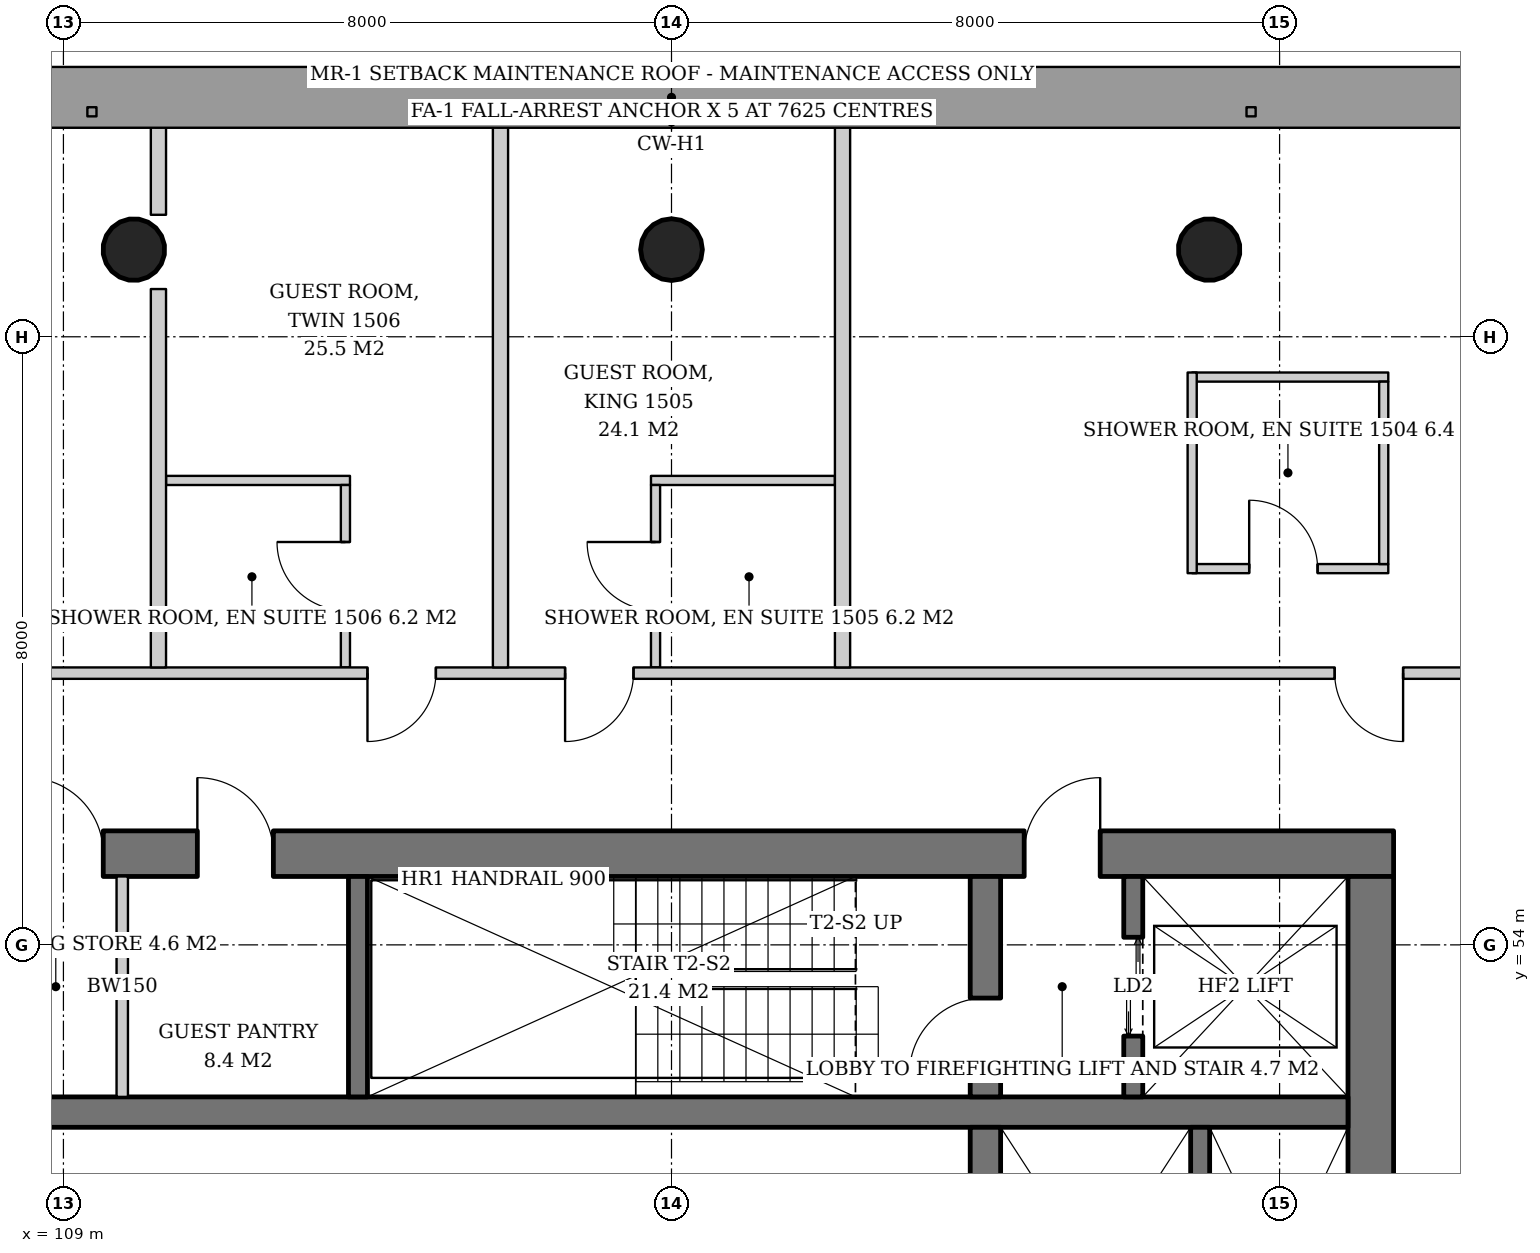
"""IFC4 building model, lengths in metres.
Left out: names, types, materials, properties, quantities, classifications, styles, units other than length and angle.
Written with IfcOpenShell. Run it as: python <this file> out.ifc"""

import sys

from ifc_helpers import new_model, si_unit, direction, frame, frame_2d, origin, origin_2d, place, context, subcontext, project, spatial, rectangle, hollow_circle, extrude, element, fill, save


model = new_model("IFC4")
c1 = context("Model", 3, precision=1e-05, world=origin(), true_north=direction((0.0, 1.0)))
c2 = subcontext(c1, "Body", "Model", "MODEL_VIEW")
j1 = project(units=[si_unit("LENGTHUNIT", "METRE"), si_unit("PLANEANGLEUNIT", "RADIAN")], contexts=[c1])
p1 = place(None, origin())
s1 = spatial("IfcSite", under=j1, at=p1, CompositionType="ELEMENT")
p2 = place(p1, origin())
s2 = spatial("IfcBuilding", under=s1, at=p2, CompositionType="ELEMENT")
p3 = place(p2, frame((0.0, 0.0, 62.8)))
s3 = spatial("IfcBuildingStorey", under=s2, at=p3, CompositionType="ELEMENT", Elevation=62.8)
p4 = place(p3, frame((124.099, 63.198, 0.0), z_axis=(-0.021497706284, -0.043059584825, 0.998841188968), x_axis=(0.894693706707, -0.446680166538, 0.0)))
e1 = element("IfcColumn", 1, at=p4, inside=s3, PredefinedType="COLUMN", context=c2, shape_type="SweptSolid", body=[
    extrude(hollow_circle(Radius=0.406, WallThickness=0.03, at=origin_2d()), origin(), (0.0, 0.0, 1.0), 3.804),
])
p5 = place(p3, frame((117.0, 63.198, 0.0), z_axis=(0.0, -0.043069538298, 0.999072076915), x_axis=(1.0, 0.0, 0.0)))
e2 = element("IfcColumn", 2, at=p5, inside=s3, PredefinedType="COLUMN", context=c2, shape_type="SweptSolid", body=[
    extrude(hollow_circle(Radius=0.406, WallThickness=0.03, at=origin_2d()), origin(), (0.0, 0.0, 1.0), 3.803),
])
p6 = place(p3, frame((109.901, 63.198, 0.0), z_axis=(0.021497706284, -0.043059584825, 0.998841188968), x_axis=(0.894693706707, 0.446680166538, 0.0)))
e3 = element("IfcColumn", 3, at=p6, inside=s3, PredefinedType="COLUMN", context=c2, shape_type="SweptSolid", body=[
    extrude(hollow_circle(Radius=0.406, WallThickness=0.03, at=origin_2d()), origin(), (0.0, 0.0, 1.0), 3.804),
])
p7 = place(p3, frame((107.5, 55.2, 0.0), z_axis=(0.0, 0.0, 1.0), x_axis=(1.0, 0.0, 0.0)))
e4 = element("IfcWall", 4, at=p7, inside=s3, PredefinedType="SHEAR", context=c2, shape_type="SweptSolid", body=[
    extrude(rectangle(XDim=19.0, YDim=0.6, at=frame_2d((9.5, 0.0))), origin(), (0.0, 0.0, 1.0), 3.8),
])
p8 = place(p7, frame((14.14, 0.0, 0.0)))
e5 = element("IfcOpeningElement", 5, at=p8, cuts=e4, PredefinedType="OPENING", context=c2, shape_type="SweptSolid", body=[
    extrude(rectangle(XDim=1.0, YDim=2.1, at=frame_2d((0.5, 1.05))), frame((0.0, 0.31, 0.0), z_axis=(0.0, -1.0, 0.0), x_axis=(1.0, 0.0, 0.0)), (0.0, 0.0, 1.0), 0.62),
])
p9 = place(p7, frame((1.024, 0.0, 0.0)))
e6 = element("IfcOpeningElement", 6, at=p9, cuts=e4, PredefinedType="OPENING", context=c2, shape_type="SweptSolid", body=[
    extrude(rectangle(XDim=1.0, YDim=2.1, at=frame_2d((0.5, 1.05))), frame((0.0, 0.31, 0.0), z_axis=(0.0, -1.0, 0.0), x_axis=(1.0, 0.0, 0.0)), (0.0, 0.0, 1.0), 0.62),
])
p10 = place(p7, frame((3.262, 0.0, 0.0)))
e7 = element("IfcOpeningElement", 7, at=p10, cuts=e4, PredefinedType="OPENING", context=c2, shape_type="SweptSolid", body=[
    extrude(rectangle(XDim=1.0, YDim=2.1, at=frame_2d((0.5, 1.05))), frame((0.0, 0.31, 0.0), z_axis=(0.0, -1.0, 0.0), x_axis=(1.0, 0.0, 0.0)), (0.0, 0.0, 1.0), 0.62),
])
p11 = place(p3, frame((126.2, 37.1, 0.0), z_axis=(0.0, 0.0, 1.0), x_axis=(0.0, 1.0, 0.0)))
e8 = element("IfcWall", 8, at=p11, inside=s3, PredefinedType="SHEAR", context=c2, shape_type="SweptSolid", body=[
    extrude(rectangle(XDim=17.8, YDim=0.6, at=frame_2d((8.9, 0.0))), origin(), (0.0, 0.0, 1.0), 3.8),
])
p12 = place(p11, frame((8.0, 0.0, 0.0)))
e9 = element("IfcOpeningElement", 9, at=p12, cuts=e8, PredefinedType="OPENING", context=c2, shape_type="SweptSolid", body=[
    extrude(rectangle(XDim=1.8, YDim=2.4, at=frame_2d((0.9, 1.2))), frame((0.0, 0.31, 0.0), z_axis=(0.0, -1.0, 0.0), x_axis=(1.0, 0.0, 0.0)), (0.0, 0.0, 1.0), 0.62),
])
p13 = place(p3, frame((108.1, 51.8, 0.0), z_axis=(0.0, 0.0, 1.0), x_axis=(1.0, 0.0, 0.0)))
e10 = element("IfcWall", 10, at=p13, inside=s3, PredefinedType="SHEAR", context=c2, shape_type="SweptSolid", body=[
    extrude(rectangle(XDim=17.8, YDim=0.4, at=frame_2d((8.9, 0.0))), origin(), (0.0, 0.0, 1.0), 3.8),
])
p14 = place(p3, frame((121.13, 40.4, 0.0), z_axis=(0.0, 0.0, 1.0), x_axis=(0.0, 1.0, 0.0)))
e11 = element("IfcWall", 11, at=p14, inside=s3, PredefinedType="SHEAR", context=c2, shape_type="SweptSolid", body=[
    extrude(rectangle(XDim=11.2, YDim=0.4, at=frame_2d((5.6, 0.0))), origin(), (0.0, 0.0, 1.0), 3.8),
])
p15 = place(p3, frame((121.13, 52.0, 0.0), z_axis=(0.0, 0.0, 1.0), x_axis=(0.0, 1.0, 0.0)))
e12 = element("IfcWall", 12, at=p15, inside=s3, PredefinedType="SHEAR", context=c2, shape_type="SweptSolid", body=[
    extrude(rectangle(XDim=2.9, YDim=0.4, at=frame_2d((1.45, 0.0))), origin(), (0.0, 0.0, 1.0), 3.8),
])
p16 = place(p15, frame((0.3, 0.0, 0.0)))
e13 = element("IfcOpeningElement", 13, at=p16, cuts=e12, PredefinedType="OPENING", context=c2, shape_type="SweptSolid", body=[
    extrude(rectangle(XDim=1.0, YDim=2.1, at=frame_2d((0.5, 1.05))), frame((0.0, 0.21, 0.0), z_axis=(0.0, -1.0, 0.0), x_axis=(1.0, 0.0, 0.0)), (0.0, 0.0, 1.0), 0.42),
])
p17 = place(p3, frame((112.875, 52.0, 0.0), z_axis=(0.0, 0.0, 1.0), x_axis=(0.0, 1.0, 0.0)))
e14 = element("IfcWall", 14, at=p17, inside=s3, PredefinedType="SHEAR", context=c2, shape_type="SweptSolid", body=[
    extrude(rectangle(XDim=2.9, YDim=0.25, at=frame_2d((1.45, 0.0))), origin(), (0.0, 0.0, 1.0), 3.8),
])
p18 = place(p3, frame((123.075, 52.0, 0.0), z_axis=(0.0, 0.0, 1.0), x_axis=(0.0, 1.0, 0.0)))
e15 = element("IfcWall", 15, at=p18, inside=s3, PredefinedType="SHEAR", context=c2, shape_type="SweptSolid", body=[
    extrude(rectangle(XDim=2.9, YDim=0.25, at=frame_2d((1.45, 0.0))), origin(), (0.0, 0.0, 1.0), 3.8),
])
p19 = place(p18, frame((0.8, 0.0, 0.0)))
e16 = element("IfcOpeningElement", 16, at=p19, cuts=e15, PredefinedType="OPENING", context=c2, shape_type="SweptSolid", body=[
    extrude(rectangle(XDim=1.3, YDim=2.2, at=frame_2d((0.65, 1.1))), frame((0.0, 0.135, 0.0), z_axis=(0.0, -1.0, 0.0), x_axis=(1.0, 0.0, 0.0)), (0.0, 0.0, 1.0), 0.27),
])
p20 = place(p3, frame((123.955, 47.75, 0.0), z_axis=(0.0, 0.0, 1.0), x_axis=(0.0, 1.0, 0.0)))
e17 = element("IfcWall", 17, at=p20, inside=s3, PredefinedType="SHEAR", context=c2, shape_type="SweptSolid", body=[
    extrude(rectangle(XDim=3.85, YDim=0.25, at=frame_2d((1.925, 0.0))), origin(), (0.0, 0.0, 1.0), 3.8),
])
p21 = place(p3, frame((109.774, 52.0, 0.0), z_axis=(0.0, 0.0, 1.0), x_axis=(0.0, 1.0, 0.0)))
e18 = element("IfcWall", 18, at=p21, inside=s3, PredefinedType="SOLIDWALL", context=c2, shape_type="SweptSolid", body=[
    extrude(rectangle(XDim=2.9, YDim=0.15, at=frame_2d((1.45, 0.0))), origin(), (0.0, 0.0, 1.0), 3.6),
])
p22 = place(p3, frame((123.85, 58.95, 0.0), z_axis=(0.0, 0.0, 1.0), x_axis=(1.0, 0.0, 0.0)))
e19 = element("IfcWall", 19, at=p22, inside=s3, PredefinedType="PARTITIONING", context=c2, shape_type="SweptSolid", body=[
    extrude(rectangle(XDim=2.58, YDim=0.12, at=frame_2d((1.29, 0.0))), origin(), (0.0, 0.0, 1.0), 2.8),
])
p23 = place(p22, frame((0.75, 0.0, 0.0)))
e20 = element("IfcOpeningElement", 20, at=p23, cuts=e19, PredefinedType="OPENING", context=c2, shape_type="SweptSolid", body=[
    extrude(rectangle(XDim=0.9, YDim=2.1, at=frame_2d((0.45, 1.05))), frame((0.0, 0.07, 0.0), z_axis=(0.0, -1.0, 0.0), x_axis=(1.0, 0.0, 0.0)), (0.0, 0.0, 1.0), 0.14),
])
p24 = place(p3, frame((123.85, 61.47, 0.0), z_axis=(0.0, 0.0, 1.0), x_axis=(1.0, 0.0, 0.0)))
e21 = element("IfcWall", 21, at=p24, inside=s3, PredefinedType="PARTITIONING", context=c2, shape_type="SweptSolid", body=[
    extrude(rectangle(XDim=2.58, YDim=0.12, at=frame_2d((1.29, 0.0))), origin(), (0.0, 0.0, 1.0), 2.8),
])
p25 = place(p3, frame((126.37, 59.01, 0.0), z_axis=(0.0, 0.0, 1.0), x_axis=(0.0, 1.0, 0.0)))
e22 = element("IfcWall", 22, at=p25, inside=s3, PredefinedType="PARTITIONING", context=c2, shape_type="SweptSolid", body=[
    extrude(rectangle(XDim=2.4, YDim=0.12, at=frame_2d((1.2, 0.0))), origin(), (0.0, 0.0, 1.0), 2.8),
])
p26 = place(p3, frame((123.85, 58.89, 0.0), z_axis=(0.0, 0.0, 1.0), x_axis=(0.0, 1.0, 0.0)))
e23 = element("IfcWall", 23, at=p26, inside=s3, PredefinedType="PARTITIONING", context=c2, shape_type="SweptSolid", body=[
    extrude(rectangle(XDim=2.64, YDim=0.12, at=frame_2d((1.32, 0.0))), origin(), (0.0, 0.0, 1.0), 3.6),
])
p27 = place(p3, frame((119.15, 60.11, 0.0), z_axis=(0.0, 0.0, 1.0), x_axis=(-1.0, 0.0, 0.0)))
e24 = element("IfcWall", 24, at=p27, inside=s3, PredefinedType="PARTITIONING", context=c2, shape_type="SweptSolid", body=[
    extrude(rectangle(XDim=2.42, YDim=0.12, at=frame_2d((1.21, 0.0))), origin(), (0.0, 0.0, 1.0), 2.847),
])
p28 = place(p3, frame((116.79, 57.65, 0.0), z_axis=(0.0, 0.0, 1.0), x_axis=(0.0, 1.0, 0.0)))
e25 = element("IfcWall", 25, at=p28, inside=s3, PredefinedType="PARTITIONING", context=c2, shape_type="SweptSolid", body=[
    extrude(rectangle(XDim=2.4, YDim=0.12, at=frame_2d((1.2, 0.0))), origin(), (0.0, 0.0, 1.0), 3.6),
])
p29 = place(p28, frame((0.75, 0.0, 0.0)))
e26 = element("IfcOpeningElement", 26, at=p29, cuts=e25, PredefinedType="OPENING", context=c2, shape_type="SweptSolid", body=[
    extrude(rectangle(XDim=0.9, YDim=2.1, at=frame_2d((0.45, 1.05))), frame((0.0, 0.07, 0.0), z_axis=(0.0, -1.0, 0.0), x_axis=(1.0, 0.0, 0.0)), (0.0, 0.0, 1.0), 0.14),
])
p30 = place(p3, frame((112.77, 60.11, 0.0), z_axis=(0.0, 0.0, 1.0), x_axis=(-1.0, 0.0, 0.0)))
e27 = element("IfcWall", 27, at=p30, inside=s3, PredefinedType="PARTITIONING", context=c2, shape_type="SweptSolid", body=[
    extrude(rectangle(XDim=2.42, YDim=0.12, at=frame_2d((1.21, 0.0))), origin(), (0.0, 0.0, 1.0), 3.6),
])
p31 = place(p3, frame((112.71, 57.65, 0.0), z_axis=(0.0, 0.0, 1.0), x_axis=(0.0, 1.0, 0.0)))
e28 = element("IfcWall", 28, at=p31, inside=s3, PredefinedType="PARTITIONING", context=c2, shape_type="SweptSolid", body=[
    extrude(rectangle(XDim=2.4, YDim=0.12, at=frame_2d((1.2, 0.0))), origin(), (0.0, 0.0, 1.0), 3.6),
])
p32 = place(p31, frame((0.75, 0.0, 0.0)))
e29 = element("IfcOpeningElement", 29, at=p32, cuts=e28, PredefinedType="OPENING", context=c2, shape_type="SweptSolid", body=[
    extrude(rectangle(XDim=0.9, YDim=2.1, at=frame_2d((0.45, 1.05))), frame((0.0, 0.07, 0.0), z_axis=(0.0, -1.0, 0.0), x_axis=(1.0, 0.0, 0.0)), (0.0, 0.0, 1.0), 0.14),
])
p33 = place(p3, frame((128.65, 57.575, 0.0), z_axis=(0.0, 0.0, 1.0), x_axis=(-1.0, 0.0, 0.0)))
e30 = element("IfcWall", 30, at=p33, inside=s3, PredefinedType="PARTITIONING", context=c2, shape_type="SweptSolid", body=[
    extrude(rectangle(XDim=23.15, YDim=0.15, at=frame_2d((11.575, 0.0))), origin(), (0.0, 0.0, 1.0), 2.8),
])
p34 = place(p33, frame((2.025, 0.0, 0.0)))
e31 = element("IfcOpeningElement", 31, at=p34, cuts=e30, PredefinedType="OPENING", context=c2, shape_type="SweptSolid", body=[
    extrude(rectangle(XDim=0.9, YDim=2.1, at=frame_2d((0.45, 1.05))), frame((0.0, 0.085, 0.0), z_axis=(0.0, -1.0, 0.0), x_axis=(1.0, 0.0, 0.0)), (0.0, 0.0, 1.0), 0.17),
])
p35 = place(p33, frame((12.15, 0.0, 0.0)))
e32 = element("IfcOpeningElement", 32, at=p35, cuts=e30, PredefinedType="OPENING", context=c2, shape_type="SweptSolid", body=[
    extrude(rectangle(XDim=0.9, YDim=2.1, at=frame_2d((0.45, 1.05))), frame((0.0, 0.085, 0.0), z_axis=(0.0, -1.0, 0.0), x_axis=(1.0, 0.0, 0.0)), (0.0, 0.0, 1.0), 0.17),
])
p36 = place(p33, frame((14.75, 0.0, 0.0)))
e33 = element("IfcOpeningElement", 33, at=p36, cuts=e30, PredefinedType="OPENING", context=c2, shape_type="SweptSolid", body=[
    extrude(rectangle(XDim=0.9, YDim=2.1, at=frame_2d((0.45, 1.05))), frame((0.0, 0.085, 0.0), z_axis=(0.0, -1.0, 0.0), x_axis=(1.0, 0.0, 0.0)), (0.0, 0.0, 1.0), 0.17),
])
for number, where, z_axis, x_axis in (
    (34, (119.25, 57.65, 0.0), (0.0, 0.0, 1.0), (0.0, 1.0, 0.0)),
    (35, (114.75, 57.65, 0.0), (0.0, 0.0, 1.0), (0.0, 1.0, 0.0)),
):
    element("IfcWall", number, at=place(p3, frame(where, z_axis=z_axis, x_axis=x_axis)), inside=s3, PredefinedType="PARTITIONING", context=c2, shape_type="SweptSolid", body=[
        extrude(rectangle(XDim=7.14, YDim=0.2, at=frame_2d((3.57, 0.0))), origin(), (0.0, 0.0, 1.0), 3.05),
    ])
p37 = place(p3, frame((110.25, 57.65, 0.0), z_axis=(0.0, 0.0, 1.0), x_axis=(0.0, 1.0, 0.0)))
e36 = element("IfcWall", 36, at=p37, inside=s3, PredefinedType="PARTITIONING", context=c2, shape_type="SweptSolid", body=[
    extrude(rectangle(XDim=4.978, YDim=0.2, at=frame_2d((2.489, 0.0))), origin(), (0.0, 0.0, 1.0), 3.6),
])
p38 = place(p3, frame((110.25, 63.605, 0.0), z_axis=(0.0, 0.0, 1.0), x_axis=(0.0, 1.0, 0.0)))
e37 = element("IfcWall", 37, at=p38, inside=s3, PredefinedType="PARTITIONING", context=c2, shape_type="SweptSolid", body=[
    extrude(rectangle(XDim=1.185, YDim=0.2, at=frame_2d((0.593, 0.0))), origin(), (0.0, 0.0, 1.0), 3.6),
])
p39 = place(p19, origin())
e38 = element("IfcDoor", 38, at=p39, inside=s3, OperationType="DOUBLE_DOOR_SLIDING", PredefinedType="DOOR", context=c2, shape_type="SweptSolid", body=[
    extrude(rectangle(XDim=1.3, YDim=2.2, at=frame_2d((0.65, 1.1))), frame((0.0, 0.025, 0.0), z_axis=(0.0, -1.0, 0.0), x_axis=(1.0, 0.0, 0.0)), (0.0, 0.0, 1.0), 0.05),
])
fill(e16, e38)
p40 = place(p16, origin())
e39 = element("IfcDoor", 39, at=p40, inside=s3, OperationType="SINGLE_SWING_LEFT", PredefinedType="DOOR", context=c2, shape_type="SweptSolid", body=[
    extrude(rectangle(XDim=1.0, YDim=2.1, at=frame_2d((0.5, 1.05))), frame((0.0, 0.025, 0.0), z_axis=(0.0, -1.0, 0.0), x_axis=(1.0, 0.0, 0.0)), (0.0, 0.0, 1.0), 0.05),
])
fill(e13, e39)
p41 = place(p8, origin())
e40 = element("IfcDoor", 40, at=p41, inside=s3, OperationType="SINGLE_SWING_RIGHT", PredefinedType="DOOR", context=c2, shape_type="SweptSolid", body=[
    extrude(rectangle(XDim=1.0, YDim=2.1, at=frame_2d((0.5, 1.05))), frame((0.0, 0.025, 0.0), z_axis=(0.0, -1.0, 0.0), x_axis=(1.0, 0.0, 0.0)), (0.0, 0.0, 1.0), 0.05),
])
fill(e5, e40)
p42 = place(p9, origin())
e41 = element("IfcDoor", 41, at=p42, inside=s3, OperationType="SINGLE_SWING_LEFT", PredefinedType="DOOR", context=c2, shape_type="SweptSolid", body=[
    extrude(rectangle(XDim=1.0, YDim=2.1, at=frame_2d((0.5, 1.05))), frame((0.0, -0.24, 0.0), z_axis=(0.0, -1.0, 0.0), x_axis=(1.0, 0.0, 0.0)), (0.0, 0.0, 1.0), 0.05),
])
fill(e6, e41)
p43 = place(p10, origin())
e42 = element("IfcDoor", 42, at=p43, inside=s3, OperationType="SINGLE_SWING_LEFT", PredefinedType="DOOR", context=c2, shape_type="SweptSolid", body=[
    extrude(rectangle(XDim=1.0, YDim=2.1, at=frame_2d((0.5, 1.05))), frame((0.0, -0.24, 0.0), z_axis=(0.0, -1.0, 0.0), x_axis=(1.0, 0.0, 0.0)), (0.0, 0.0, 1.0), 0.05),
])
fill(e7, e42)
p44 = place(p23, origin())
e43 = element("IfcDoor", 43, at=p44, inside=s3, OperationType="SINGLE_SWING_LEFT", PredefinedType="DOOR", context=c2, shape_type="SweptSolid", body=[
    extrude(rectangle(XDim=0.9, YDim=2.1, at=frame_2d((0.45, 1.05))), frame((0.0, 0.025, 0.0), z_axis=(0.0, -1.0, 0.0), x_axis=(1.0, 0.0, 0.0)), (0.0, 0.0, 1.0), 0.05),
])
fill(e20, e43)
p45 = place(p29, origin())
e44 = element("IfcDoor", 44, at=p45, inside=s3, OperationType="SINGLE_SWING_RIGHT", PredefinedType="DOOR", context=c2, shape_type="SweptSolid", body=[
    extrude(rectangle(XDim=0.9, YDim=2.1, at=frame_2d((0.45, 1.05))), frame((0.0, 0.025, 0.0), z_axis=(0.0, -1.0, 0.0), x_axis=(1.0, 0.0, 0.0)), (0.0, 0.0, 1.0), 0.05),
])
fill(e26, e44)
p46 = place(p32, origin())
e45 = element("IfcDoor", 45, at=p46, inside=s3, OperationType="SINGLE_SWING_RIGHT", PredefinedType="DOOR", context=c2, shape_type="SweptSolid", body=[
    extrude(rectangle(XDim=0.9, YDim=2.1, at=frame_2d((0.45, 1.05))), frame((0.0, 0.025, 0.0), z_axis=(0.0, -1.0, 0.0), x_axis=(1.0, 0.0, 0.0)), (0.0, 0.0, 1.0), 0.05),
])
fill(e29, e45)
p47 = place(p34, origin())
e46 = element("IfcDoor", 46, at=p47, inside=s3, OperationType="SINGLE_SWING_LEFT", PredefinedType="DOOR", context=c2, shape_type="SweptSolid", body=[
    extrude(rectangle(XDim=0.9, YDim=2.1, at=frame_2d((0.45, 1.05))), frame((0.0, 0.025, 0.0), z_axis=(0.0, -1.0, 0.0), x_axis=(1.0, 0.0, 0.0)), (0.0, 0.0, 1.0), 0.05),
])
fill(e31, e46)
p48 = place(p35, origin())
e47 = element("IfcDoor", 47, at=p48, inside=s3, OperationType="SINGLE_SWING_RIGHT", PredefinedType="DOOR", context=c2, shape_type="SweptSolid", body=[
    extrude(rectangle(XDim=0.9, YDim=2.1, at=frame_2d((0.45, 1.05))), frame((0.0, 0.025, 0.0), z_axis=(0.0, -1.0, 0.0), x_axis=(1.0, 0.0, 0.0)), (0.0, 0.0, 1.0), 0.05),
])
fill(e32, e47)
p49 = place(p36, origin())
e48 = element("IfcDoor", 48, at=p49, inside=s3, OperationType="SINGLE_SWING_RIGHT", PredefinedType="DOOR", context=c2, shape_type="SweptSolid", body=[
    extrude(rectangle(XDim=0.9, YDim=2.1, at=frame_2d((0.45, 1.05))), frame((0.0, 0.025, 0.0), z_axis=(0.0, -1.0, 0.0), x_axis=(1.0, 0.0, 0.0)), (0.0, 0.0, 1.0), 0.05),
])
fill(e33, e48)
save(model, sys.argv[1])
